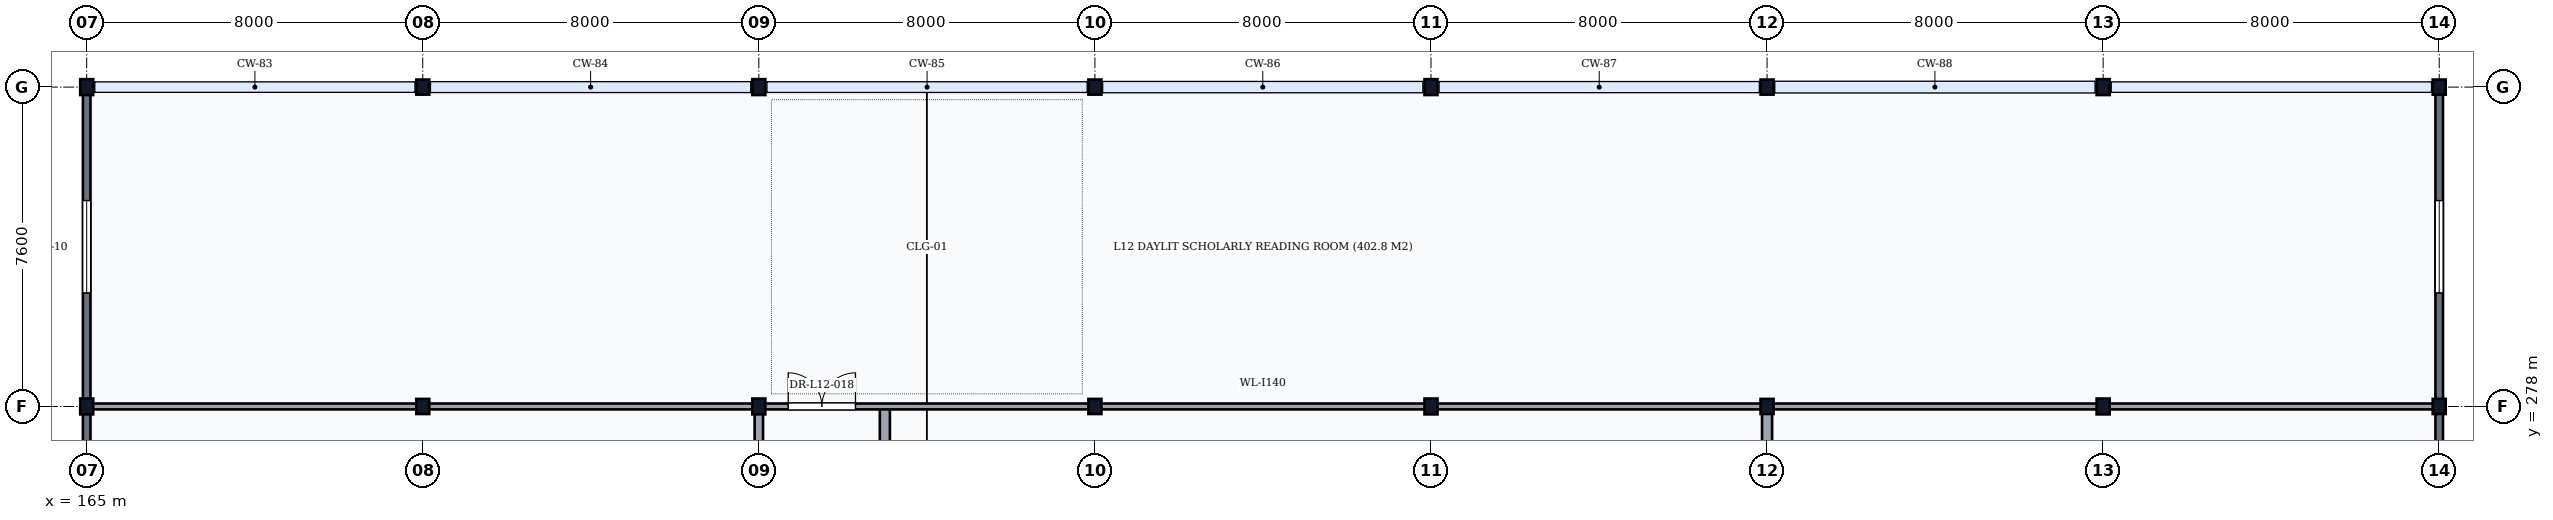
"""IFC4 building model, lengths in metres.
Left out: names, types, materials, properties, quantities, classifications, styles, units other than length and angle.
Written with IfcOpenShell. Run it as: python <this file> out.ifc"""

import sys

from ifc_helpers import new_model, si_unit, direction, frame, frame_2d, origin, origin_2d, place, context, subcontext, project, spatial, rectangle, i_section, extrude, element, fill, save


model = new_model("IFC4")
c1 = context("Model", 3, precision=1e-05, world=origin(), true_north=direction((0.0, 1.0)))
c2 = subcontext(c1, "Body", "Model", "MODEL_VIEW")
j1 = project(units=[si_unit("LENGTHUNIT", "METRE"), si_unit("PLANEANGLEUNIT", "RADIAN")], contexts=[c1])
p1 = place(None, origin())
s1 = spatial("IfcSite", under=j1, at=p1, CompositionType="ELEMENT")
p2 = place(p1, origin())
s2 = spatial("IfcBuilding", under=s1, at=p2, CompositionType="ELEMENT")
p3 = place(p2, frame((0.0, 0.0, 47.7)))
s3 = spatial("IfcBuildingStorey", under=s2, at=p3, CompositionType="ELEMENT", Elevation=47.7)
for number, where, z_axis, x_axis in (
    (1, (165.0, 278.0, 0.0), (0.0, 0.0, 1.0), (1.0, 0.0, 0.0)),
    (2, (165.0, 285.6, 0.0), (0.0, 0.0, 1.0), (1.0, 0.0, 0.0)),
):
    element("IfcColumn", number, at=place(p3, frame(where, z_axis=z_axis, x_axis=x_axis)), inside=s3, PredefinedType="COLUMN", context=c2, shape_type="SweptSolid", body=[
        extrude(i_section(OverallWidth=0.309, OverallDepth=0.377, WebThickness=0.021, FlangeThickness=0.04, FilletRadius=0.027, at=origin_2d()), origin(), (0.0, 0.0, 1.0), 3.9),
    ])
for number, where, z_axis, x_axis in (
    (3, (173.0, 278.0, 0.0), (0.0, 0.0, 1.0), (1.0, 0.0, 0.0)),
    (4, (173.0, 285.6, 0.0), (0.0, 0.0, 1.0), (1.0, 0.0, 0.0)),
):
    element("IfcColumn", number, at=place(p3, frame(where, z_axis=z_axis, x_axis=x_axis)), inside=s3, PredefinedType="COLUMN", context=c2, shape_type="SweptSolid", body=[
        extrude(i_section(OverallWidth=0.309, OverallDepth=0.359, WebThickness=0.021, FlangeThickness=0.04, FilletRadius=0.027, at=origin_2d()), origin(), (0.0, 0.0, 1.0), 3.9),
    ])
for number, where, z_axis, x_axis in (
    (5, (181.0, 278.0, 0.0), (0.0, 0.0, 1.0), (1.0, 0.0, 0.0)),
    (6, (181.0, 285.6, 0.0), (0.0, 0.0, 1.0), (1.0, 0.0, 0.0)),
):
    element("IfcColumn", number, at=place(p3, frame(where, z_axis=z_axis, x_axis=x_axis)), inside=s3, PredefinedType="COLUMN", context=c2, shape_type="SweptSolid", body=[
        extrude(i_section(OverallWidth=0.309, OverallDepth=0.377, WebThickness=0.021, FlangeThickness=0.04, FilletRadius=0.027, at=origin_2d()), origin(), (0.0, 0.0, 1.0), 3.9),
    ])
for number, where, z_axis, x_axis in (
    (7, (189.0, 278.0, 0.0), (0.0, 0.0, 1.0), (1.0, 0.0, 0.0)),
    (8, (189.0, 285.6, 0.0), (0.0, 0.0, 1.0), (1.0, 0.0, 0.0)),
):
    element("IfcColumn", number, at=place(p3, frame(where, z_axis=z_axis, x_axis=x_axis)), inside=s3, PredefinedType="COLUMN", context=c2, shape_type="SweptSolid", body=[
        extrude(i_section(OverallWidth=0.309, OverallDepth=0.359, WebThickness=0.021, FlangeThickness=0.04, FilletRadius=0.027, at=origin_2d()), origin(), (0.0, 0.0, 1.0), 3.9),
    ])
for number, where, z_axis, x_axis in (
    (9, (197.0, 278.0, 0.0), (0.0, 0.0, 1.0), (1.0, 0.0, 0.0)),
    (10, (197.0, 285.6, 0.0), (0.0, 0.0, 1.0), (1.0, 0.0, 0.0)),
):
    element("IfcColumn", number, at=place(p3, frame(where, z_axis=z_axis, x_axis=x_axis)), inside=s3, PredefinedType="COLUMN", context=c2, shape_type="SweptSolid", body=[
        extrude(i_section(OverallWidth=0.309, OverallDepth=0.377, WebThickness=0.021, FlangeThickness=0.04, FilletRadius=0.027, at=origin_2d()), origin(), (0.0, 0.0, 1.0), 3.9),
    ])
for number, where, z_axis, x_axis in (
    (11, (205.0, 278.0, 0.0), (0.0, 0.0, 1.0), (1.0, 0.0, 0.0)),
    (12, (205.0, 285.6, 0.0), (0.0, 0.0, 1.0), (1.0, 0.0, 0.0)),
):
    element("IfcColumn", number, at=place(p3, frame(where, z_axis=z_axis, x_axis=x_axis)), inside=s3, PredefinedType="COLUMN", context=c2, shape_type="SweptSolid", body=[
        extrude(i_section(OverallWidth=0.309, OverallDepth=0.359, WebThickness=0.021, FlangeThickness=0.04, FilletRadius=0.027, at=origin_2d()), origin(), (0.0, 0.0, 1.0), 3.9),
    ])
for number, where, z_axis, x_axis in (
    (13, (213.0, 278.0, 0.0), (0.0, 0.0, 1.0), (1.0, 0.0, 0.0)),
    (14, (213.0, 285.6, 0.0), (0.0, 0.0, 1.0), (1.0, 0.0, 0.0)),
):
    element("IfcColumn", number, at=place(p3, frame(where, z_axis=z_axis, x_axis=x_axis)), inside=s3, PredefinedType="COLUMN", context=c2, shape_type="SweptSolid", body=[
        extrude(i_section(OverallWidth=0.309, OverallDepth=0.377, WebThickness=0.021, FlangeThickness=0.04, FilletRadius=0.027, at=origin_2d()), origin(), (0.0, 0.0, 1.0), 3.9),
    ])
for number, where, z_axis, x_axis in (
    (15, (221.0, 278.0, 0.0), (0.0, 0.0, 1.0), (1.0, 0.0, 0.0)),
    (16, (221.0, 285.6, 0.0), (0.0, 0.0, 1.0), (1.0, 0.0, 0.0)),
):
    element("IfcColumn", number, at=place(p3, frame(where, z_axis=z_axis, x_axis=x_axis)), inside=s3, PredefinedType="COLUMN", context=c2, shape_type="SweptSolid", body=[
        extrude(i_section(OverallWidth=0.309, OverallDepth=0.359, WebThickness=0.021, FlangeThickness=0.04, FilletRadius=0.027, at=origin_2d()), origin(), (0.0, 0.0, 1.0), 3.9),
    ])
p4 = place(p3, frame((165.0, 270.406, 0.0), z_axis=(0.0, 0.0, 1.0), x_axis=(0.0, 1.0, 0.0)))
e17 = element("IfcWall", 17, at=p4, inside=s3, PredefinedType="SOLIDWALL", context=c2, shape_type="SweptSolid", body=[
    extrude(rectangle(XDim=7.588, YDim=0.18, at=frame_2d((3.794, 0.0))), origin(), (0.0, 0.0, 1.0), 3.338),
])
p5 = place(p4, frame((2.594, 0.0, 0.95)))
e18 = element("IfcOpeningElement", 18, at=p5, cuts=e17, PredefinedType="OPENING", context=c2, shape_type="SweptSolid", body=[
    extrude(rectangle(XDim=2.4, YDim=2.2, at=frame_2d((1.2, 1.1))), frame((0.0, 0.105, 0.0), z_axis=(0.0, -1.0, 0.0), x_axis=(1.0, 0.0, 0.0)), (0.0, 0.0, 1.0), 0.21),
])
p6 = place(p3, frame((165.0, 278.006, 0.0), z_axis=(0.0, 0.0, 1.0), x_axis=(0.0, 1.0, 0.0)))
e19 = element("IfcWall", 19, at=p6, inside=s3, PredefinedType="SOLIDWALL", context=c2, shape_type="SweptSolid", body=[
    extrude(rectangle(XDim=7.588, YDim=0.18, at=frame_2d((3.794, 0.0))), origin(), (0.0, 0.0, 1.0), 3.338),
])
p7 = place(p6, frame((2.694, 0.0, 0.95)))
e20 = element("IfcOpeningElement", 20, at=p7, cuts=e19, PredefinedType="OPENING", context=c2, shape_type="SweptSolid", body=[
    extrude(rectangle(XDim=2.2, YDim=2.1, at=frame_2d((1.1, 1.05))), frame((0.0, 0.105, 0.0), z_axis=(0.0, -1.0, 0.0), x_axis=(1.0, 0.0, 0.0)), (0.0, 0.0, 1.0), 0.21),
])
p8 = place(p3, frame((221.0, 270.406, 0.0), z_axis=(0.0, 0.0, 1.0), x_axis=(0.0, 1.0, 0.0)))
e21 = element("IfcWall", 21, at=p8, inside=s3, PredefinedType="SOLIDWALL", context=c2, shape_type="SweptSolid", body=[
    extrude(rectangle(XDim=7.588, YDim=0.18, at=frame_2d((3.794, 0.0))), origin(), (0.0, 0.0, 1.0), 3.338),
])
p9 = place(p8, frame((2.594, 0.0, 0.95)))
e22 = element("IfcOpeningElement", 22, at=p9, cuts=e21, PredefinedType="OPENING", context=c2, shape_type="SweptSolid", body=[
    extrude(rectangle(XDim=2.4, YDim=2.2, at=frame_2d((1.2, 1.1))), frame((0.0, 0.105, 0.0), z_axis=(0.0, -1.0, 0.0), x_axis=(1.0, 0.0, 0.0)), (0.0, 0.0, 1.0), 0.21),
])
p10 = place(p3, frame((221.0, 278.006, 0.0), z_axis=(0.0, 0.0, 1.0), x_axis=(0.0, 1.0, 0.0)))
e23 = element("IfcWall", 23, at=p10, inside=s3, PredefinedType="SOLIDWALL", context=c2, shape_type="SweptSolid", body=[
    extrude(rectangle(XDim=7.588, YDim=0.18, at=frame_2d((3.794, 0.0))), origin(), (0.0, 0.0, 1.0), 3.338),
])
p11 = place(p10, frame((2.694, 0.0, 0.95)))
e24 = element("IfcOpeningElement", 24, at=p11, cuts=e23, PredefinedType="OPENING", context=c2, shape_type="SweptSolid", body=[
    extrude(rectangle(XDim=2.2, YDim=2.1, at=frame_2d((1.1, 1.05))), frame((0.0, 0.105, 0.0), z_axis=(0.0, -1.0, 0.0), x_axis=(1.0, 0.0, 0.0)), (0.0, 0.0, 1.0), 0.21),
])
p12 = place(p3, frame((181.0, 258.2, 0.0), z_axis=(0.0, 0.0, 1.0), x_axis=(0.0, 1.0, 0.0)))
e25 = element("IfcWall", 25, at=p12, inside=s3, PredefinedType="PARTITIONING", context=c2, shape_type="SweptSolid", body=[
    extrude(rectangle(XDim=19.8, YDim=0.2, at=frame_2d((9.9, 0.0))), origin(), (0.0, 0.0, 1.0), 3.208),
])
p13 = place(p12, frame((2.025, 0.0, 0.0)))
e26 = element("IfcOpeningElement", 26, at=p13, cuts=e25, PredefinedType="OPENING", context=c2, shape_type="SweptSolid", body=[
    extrude(rectangle(XDim=0.95, YDim=2.1, at=frame_2d((0.475, 1.05))), frame((0.0, 0.115, 0.0), z_axis=(0.0, -1.0, 0.0), x_axis=(1.0, 0.0, 0.0)), (0.0, 0.0, 1.0), 0.23),
])
p14 = place(p12, frame((8.525, 0.0, 0.0)))
e27 = element("IfcOpeningElement", 27, at=p14, cuts=e25, PredefinedType="OPENING", context=c2, shape_type="SweptSolid", body=[
    extrude(rectangle(XDim=0.95, YDim=2.1, at=frame_2d((0.475, 1.05))), frame((0.0, 0.115, 0.0), z_axis=(0.0, -1.0, 0.0), x_axis=(1.0, 0.0, 0.0)), (0.0, 0.0, 1.0), 0.23),
])
p15 = place(p12, frame((15.525, 0.0, 0.0)))
e28 = element("IfcOpeningElement", 28, at=p15, cuts=e25, PredefinedType="OPENING", context=c2, shape_type="SweptSolid", body=[
    extrude(rectangle(XDim=0.95, YDim=2.1, at=frame_2d((0.475, 1.05))), frame((0.0, 0.115, 0.0), z_axis=(0.0, -1.0, 0.0), x_axis=(1.0, 0.0, 0.0)), (0.0, 0.0, 1.0), 0.23),
])
p16 = place(p3, frame((184.0, 258.2, 0.0), z_axis=(0.0, 0.0, 1.0), x_axis=(0.0, 1.0, 0.0)))
e29 = element("IfcWall", 29, at=p16, inside=s3, PredefinedType="PARTITIONING", context=c2, shape_type="SweptSolid", body=[
    extrude(rectangle(XDim=19.8, YDim=0.24, at=frame_2d((9.9, 0.0))), origin(), (0.0, 0.0, 1.0), 3.61),
])
p17 = place(p3, frame((205.0, 258.2, 0.0), z_axis=(0.0, 0.0, 1.0), x_axis=(0.0, 1.0, 0.0)))
e30 = element("IfcWall", 30, at=p17, inside=s3, PredefinedType="PARTITIONING", context=c2, shape_type="SweptSolid", body=[
    extrude(rectangle(XDim=19.8, YDim=0.24, at=frame_2d((9.9, 0.0))), origin(), (0.0, 0.0, 1.0), 3.208),
])
p18 = place(p3, frame((165.0, 278.0, 0.0), z_axis=(0.0, 0.0, 1.0), x_axis=(1.0, 0.0, 0.0)))
e31 = element("IfcWall", 31, at=p18, inside=s3, PredefinedType="PARTITIONING", context=c2, shape_type="SweptSolid", body=[
    extrude(rectangle(XDim=56.0, YDim=0.14, at=frame_2d((28.0, 0.0))), origin(), (0.0, 0.0, 1.0), 3.108),
])
p19 = place(p18, frame((16.7, 0.0, 0.0)))
e32 = element("IfcOpeningElement", 32, at=p19, cuts=e31, PredefinedType="OPENING", context=c2, shape_type="SweptSolid", body=[
    extrude(rectangle(XDim=1.6, YDim=2.25, at=frame_2d((0.8, 1.125))), frame((0.0, 0.085, 0.0), z_axis=(0.0, -1.0, 0.0), x_axis=(1.0, 0.0, 0.0)), (0.0, 0.0, 1.0), 0.17),
])
p20 = place(p7, origin())
e33 = element("IfcWindow", 33, at=p20, inside=s3, PartitioningType="DOUBLE_PANEL_VERTICAL", PredefinedType="WINDOW", context=c2, shape_type="SweptSolid", body=[
    extrude(rectangle(XDim=2.2, YDim=2.1, at=frame_2d((1.1, 1.05))), frame((0.0, 0.03, 0.0), z_axis=(0.0, -1.0, 0.0), x_axis=(1.0, 0.0, 0.0)), (0.0, 0.0, 1.0), 0.06),
])
fill(e20, e33)
p21 = place(p11, origin())
e34 = element("IfcWindow", 34, at=p21, inside=s3, PartitioningType="DOUBLE_PANEL_VERTICAL", PredefinedType="WINDOW", context=c2, shape_type="SweptSolid", body=[
    extrude(rectangle(XDim=2.2, YDim=2.1, at=frame_2d((1.1, 1.05))), frame((0.0, 0.03, 0.0), z_axis=(0.0, -1.0, 0.0), x_axis=(1.0, 0.0, 0.0)), (0.0, 0.0, 1.0), 0.06),
])
fill(e24, e34)
p22 = place(p19, origin())
e35 = element("IfcDoor", 35, at=p22, inside=s3, OperationType="DOUBLE_DOOR_SINGLE_SWING", PredefinedType="DOOR", context=c2, shape_type="SweptSolid", body=[
    extrude(rectangle(XDim=1.6, YDim=2.25, at=frame_2d((0.8, 1.125))), frame((0.0, 0.025, 0.0), z_axis=(0.0, -1.0, 0.0), x_axis=(1.0, 0.0, 0.0)), (0.0, 0.0, 1.0), 0.05),
])
fill(e32, e35)
save(model, sys.argv[1])
